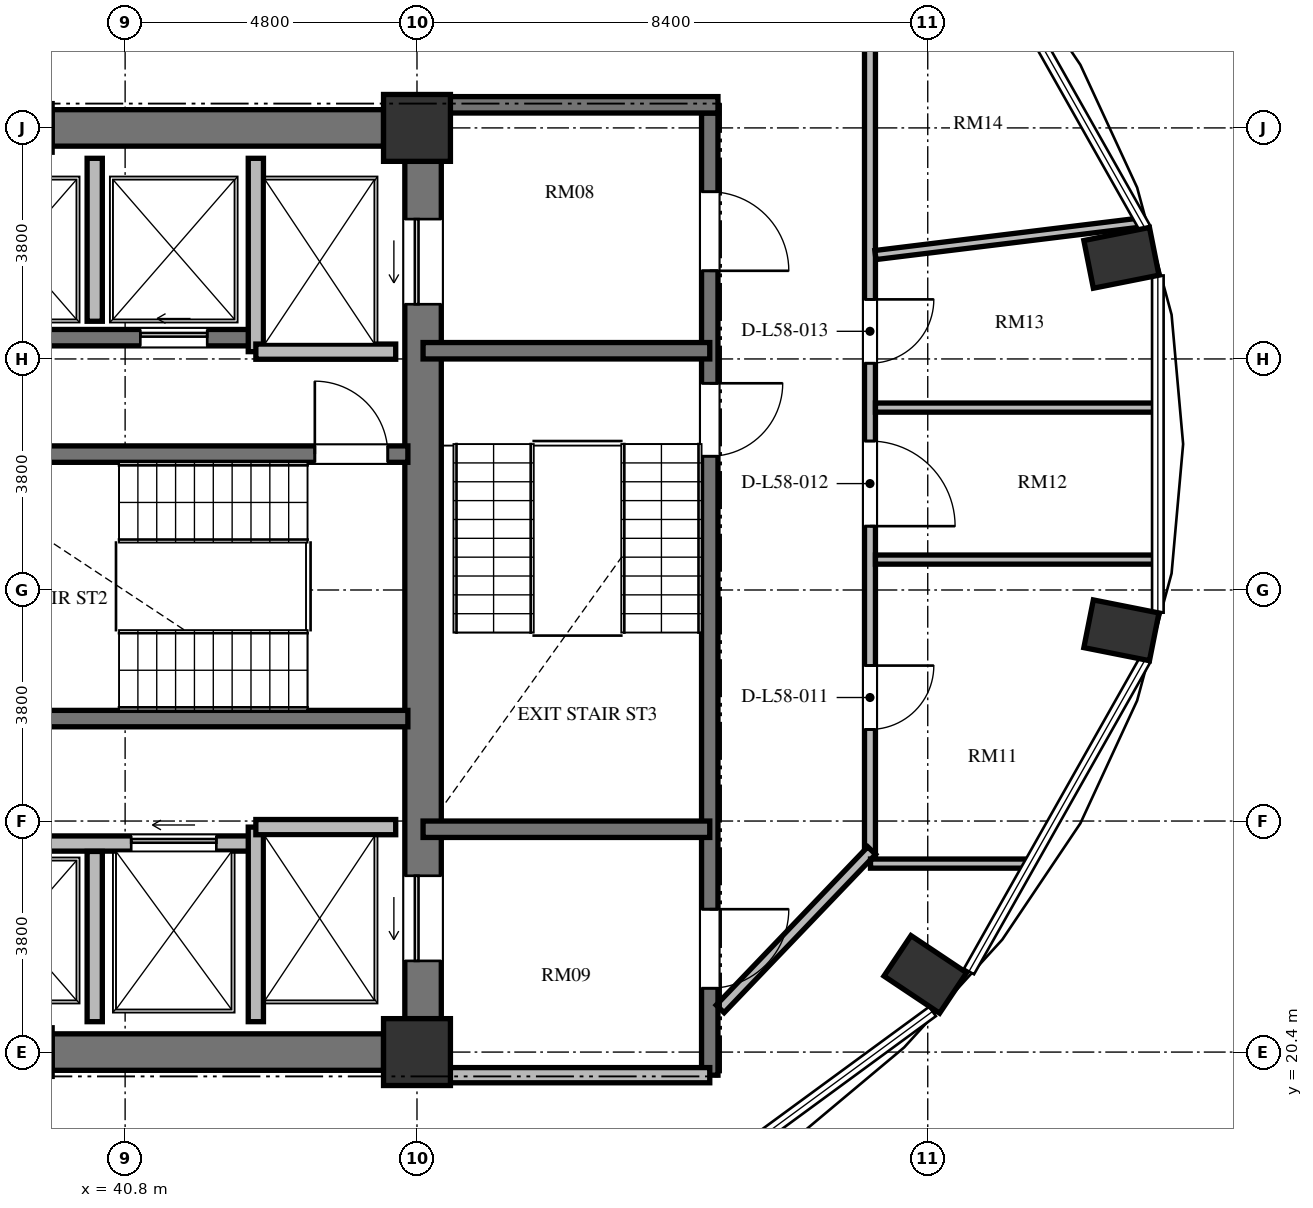
"""IFC4 building model, lengths in metres.
Left out: names, types, materials, properties, quantities, classifications, styles, units other than length and angle.
Written with IfcOpenShell. Run it as: python <this file> out.ifc"""

import sys

from ifc_helpers import new_model, si_unit, direction, frame, frame_2d, origin, origin_2d, place, context, subcontext, project, spatial, rectangle, extrude, element, fill, save


model = new_model("IFC4")
c1 = context("Model", 3, precision=1e-05, world=origin(), true_north=direction((0.0, 1.0)))
c2 = subcontext(c1, "Body", "Model", "MODEL_VIEW")
j1 = project(units=[si_unit("LENGTHUNIT", "METRE"), si_unit("PLANEANGLEUNIT", "RADIAN")], contexts=[c1])
p1 = place(None, origin())
s1 = spatial("IfcSite", under=j1, at=p1, CompositionType="ELEMENT")
p2 = place(p1, origin())
s2 = spatial("IfcBuilding", under=s1, at=p2, CompositionType="ELEMENT")
p3 = place(p2, frame((0.0, 0.0, 224.016)))
s3 = spatial("IfcBuildingStorey", under=s2, at=p3, CompositionType="ELEMENT", Elevation=224.016)
for number, where, z_axis, x_axis in (
    (1, (53.96, 21.677, 0.0), (0.0, 0.0, 1.0), (0.831, -0.556, 0.0)),
    (2, (57.185, 27.337, 0.0), (0.0, 0.0, 1.0), (0.981, -0.195, 0.0)),
    (3, (57.185, 33.463, 0.0), (0.0, 0.0, 1.0), (0.981, 0.195, 0.0)),
):
    element("IfcColumn", number, at=place(p3, frame(where, z_axis=z_axis, x_axis=x_axis)), inside=s3, PredefinedType="COLUMN", context=c2, shape_type="SweptSolid", body=[
        extrude(rectangle(XDim=1.1, YDim=0.8, at=origin_2d()), origin(), (0.0, 0.0, 1.0), 3.648),
    ])
for number, where, z_axis, x_axis in (
    (4, (45.6, 20.4, 0.0), (0.0, 0.0, 1.0), (1.0, 0.0, 0.0)),
    (5, (45.6, 35.6, 0.0), (0.0, 0.0, 1.0), (1.0, 0.0, 0.0)),
):
    element("IfcColumn", number, at=place(p3, frame(where, z_axis=z_axis, x_axis=x_axis)), inside=s3, PredefinedType="COLUMN", context=c2, shape_type="SweptSolid", body=[
        extrude(rectangle(XDim=1.1, YDim=1.1, at=origin_2d()), origin(), (0.0, 0.0, 1.0), 3.648),
    ])
p4 = place(p3, frame((45.7, 20.95, 0.0), z_axis=(0.0, 0.0, 1.0), x_axis=(0.0, 1.0, 0.0)))
e6 = element("IfcWall", 6, at=p4, inside=s3, PredefinedType="SHEAR", context=c2, shape_type="SweptSolid", body=[
    extrude(rectangle(XDim=14.1, YDim=0.6, at=frame_2d((7.05, 0.0))), origin(), (0.0, 0.0, 1.0), 3.648),
])
p5 = place(p4, frame((11.75, 0.0, 0.0)))
e7 = element("IfcOpeningElement", 7, at=p5, cuts=e6, PredefinedType="OPENING", context=c2, shape_type="SweptSolid", body=[
    extrude(rectangle(XDim=1.4, YDim=2.3, at=frame_2d((0.7, 1.15))), frame((0.0, 0.31, 0.0), z_axis=(0.0, -1.0, 0.0), x_axis=(1.0, 0.0, 0.0)), (0.0, 0.0, 1.0), 0.62),
])
p6 = place(p4, frame((0.95, 0.0, 0.0)))
e8 = element("IfcOpeningElement", 8, at=p6, cuts=e6, PredefinedType="OPENING", context=c2, shape_type="SweptSolid", body=[
    extrude(rectangle(XDim=1.4, YDim=2.3, at=frame_2d((0.7, 1.15))), frame((0.0, 0.31, 0.0), z_axis=(0.0, -1.0, 0.0), x_axis=(1.0, 0.0, 0.0)), (0.0, 0.0, 1.0), 0.62),
])
for number, where, z_axis, x_axis in (
    (9, (39.6, 20.4, 0.0), (0.0, 0.0, 1.0), (1.0, 0.0, 0.0)),
    (10, (39.6, 35.6, 0.0), (0.0, 0.0, 1.0), (1.0, 0.0, 0.0)),
):
    element("IfcWall", number, at=place(p3, frame(where, z_axis=z_axis, x_axis=x_axis)), inside=s3, PredefinedType="SHEAR", context=c2, shape_type="SweptSolid", body=[
        extrude(rectangle(XDim=5.45, YDim=0.6, at=frame_2d((2.725, 0.0))), origin(), (0.0, 0.0, 1.0), 3.648),
    ])
p7 = place(p3, frame((37.465, 30.235, 0.0), z_axis=(0.0, 0.0, 1.0), x_axis=(1.0, 0.0, 0.0)))
e11 = element("IfcWall", 11, at=p7, inside=s3, PredefinedType="SHEAR", context=c2, shape_type="SweptSolid", body=[
    extrude(rectangle(XDim=7.985, YDim=0.27, at=frame_2d((3.992, 0.0))), origin(), (0.0, 0.0, 1.0), 3.648),
])
p8 = place(p7, frame((6.455, 0.0, 0.0)))
e12 = element("IfcOpeningElement", 12, at=p8, cuts=e11, PredefinedType="OPENING", context=c2, shape_type="SweptSolid", body=[
    extrude(rectangle(XDim=1.2, YDim=2.15, at=frame_2d((0.6, 1.075))), frame((0.0, 0.145, 0.0), z_axis=(0.0, -1.0, 0.0), x_axis=(1.0, 0.0, 0.0)), (0.0, 0.0, 1.0), 0.29),
])
p9 = place(p3, frame((37.465, 25.885, 0.0), z_axis=(0.0, 0.0, 1.0), x_axis=(1.0, 0.0, 0.0)))
e13 = element("IfcWall", 13, at=p9, inside=s3, PredefinedType="SHEAR", context=c2, shape_type="SweptSolid", body=[
    extrude(rectangle(XDim=7.985, YDim=0.27, at=frame_2d((3.992, 0.0))), origin(), (0.0, 0.0, 1.0), 3.648),
])
p10 = place(p3, frame((26.55, 32.15, 0.0), z_axis=(0.0, 0.0, 1.0), x_axis=(1.0, 0.0, 0.0)))
e14 = element("IfcWall", 14, at=p10, inside=s3, PredefinedType="SHEAR", context=c2, shape_type="SweptSolid", body=[
    extrude(rectangle(XDim=16.4, YDim=0.27, at=frame_2d((8.2, 0.0))), origin(), (0.0, 0.0, 1.0), 3.648),
])
p11 = place(p10, frame((2.175, 0.0, 0.0)))
e15 = element("IfcOpeningElement", 15, at=p11, cuts=e14, PredefinedType="OPENING", context=c2, shape_type="SweptSolid", body=[
    extrude(rectangle(XDim=1.05, YDim=2.15, at=frame_2d((0.525, 1.075))), frame((0.0, 0.145, 0.0), z_axis=(0.0, -1.0, 0.0), x_axis=(1.0, 0.0, 0.0)), (0.0, 0.0, 1.0), 0.29),
])
p12 = place(p10, frame((7.575, 0.0, 0.0)))
e16 = element("IfcOpeningElement", 16, at=p12, cuts=e14, PredefinedType="OPENING", context=c2, shape_type="SweptSolid", body=[
    extrude(rectangle(XDim=1.05, YDim=2.15, at=frame_2d((0.525, 1.075))), frame((0.0, 0.145, 0.0), z_axis=(0.0, -1.0, 0.0), x_axis=(1.0, 0.0, 0.0)), (0.0, 0.0, 1.0), 0.29),
])
p13 = place(p10, frame((11.9, 0.0, 0.0)))
e17 = element("IfcOpeningElement", 17, at=p13, cuts=e14, PredefinedType="OPENING", context=c2, shape_type="SweptSolid", body=[
    extrude(rectangle(XDim=1.1, YDim=2.2, at=frame_2d((0.55, 1.1))), frame((0.0, 0.145, 0.0), z_axis=(0.0, -1.0, 0.0), x_axis=(1.0, 0.0, 0.0)), (0.0, 0.0, 1.0), 0.29),
])
p14 = place(p10, frame((14.5, 0.0, 0.0)))
e18 = element("IfcOpeningElement", 18, at=p14, cuts=e14, PredefinedType="OPENING", context=c2, shape_type="SweptSolid", body=[
    extrude(rectangle(XDim=1.1, YDim=2.2, at=frame_2d((0.55, 1.1))), frame((0.0, 0.145, 0.0), z_axis=(0.0, -1.0, 0.0), x_axis=(1.0, 0.0, 0.0)), (0.0, 0.0, 1.0), 0.29),
])
p15 = place(p3, frame((26.75, 23.83, 0.0), z_axis=(0.0, 0.0, 1.0), x_axis=(1.0, 0.0, 0.0)))
e19 = element("IfcWall", 19, at=p15, inside=s3, PredefinedType="SOLIDWALL", context=c2, shape_type="SweptSolid", body=[
    extrude(rectangle(XDim=16.2, YDim=0.25, at=frame_2d((8.1, 0.0))), origin(), (0.0, 0.0, 1.0), 3.448),
])
p16 = place(p15, frame((4.75, 0.0, 0.0)))
e20 = element("IfcOpeningElement", 20, at=p16, cuts=e19, PredefinedType="OPENING", context=c2, shape_type="SweptSolid", body=[
    extrude(rectangle(XDim=1.4, YDim=2.2, at=frame_2d((0.7, 1.1))), frame((0.0, 0.135, 0.0), z_axis=(0.0, -1.0, 0.0), x_axis=(1.0, 0.0, 0.0)), (0.0, 0.0, 1.0), 0.27),
])
p17 = place(p15, frame((11.7, 0.0, 0.0)))
e21 = element("IfcOpeningElement", 21, at=p17, cuts=e19, PredefinedType="OPENING", context=c2, shape_type="SweptSolid", body=[
    extrude(rectangle(XDim=1.1, YDim=2.2, at=frame_2d((0.55, 1.1))), frame((0.0, 0.135, 0.0), z_axis=(0.0, -1.0, 0.0), x_axis=(1.0, 0.0, 0.0)), (0.0, 0.0, 1.0), 0.27),
])
p18 = place(p15, frame((14.15, 0.0, 0.0)))
e22 = element("IfcOpeningElement", 22, at=p18, cuts=e19, PredefinedType="OPENING", context=c2, shape_type="SweptSolid", body=[
    extrude(rectangle(XDim=1.4, YDim=2.3, at=frame_2d((0.7, 1.15))), frame((0.0, 0.135, 0.0), z_axis=(0.0, -1.0, 0.0), x_axis=(1.0, 0.0, 0.0)), (0.0, 0.0, 1.0), 0.27),
])
p19 = place(p3, frame((42.95, 31.92, 0.0), z_axis=(0.0, 0.0, 1.0), x_axis=(0.0, 1.0, 0.0)))
e23 = element("IfcWall", 23, at=p19, inside=s3, PredefinedType="SOLIDWALL", context=c2, shape_type="SweptSolid", body=[
    extrude(rectangle(XDim=3.18, YDim=0.25, at=frame_2d((1.59, 0.0))), origin(), (0.0, 0.0, 1.0), 3.448),
])
p20 = place(p3, frame((42.95, 31.92, 0.0), z_axis=(0.0, 0.0, 1.0), x_axis=(1.0, 0.0, 0.0)))
e24 = element("IfcWall", 24, at=p20, inside=s3, PredefinedType="SOLIDWALL", context=c2, shape_type="SweptSolid", body=[
    extrude(rectangle(XDim=2.3, YDim=0.25, at=frame_2d((1.15, 0.0))), origin(), (0.0, 0.0, 1.0), 3.448),
])
p21 = place(p3, frame((42.95, 20.9, 0.0), z_axis=(0.0, 0.0, 1.0), x_axis=(0.0, 1.0, 0.0)))
e25 = element("IfcWall", 25, at=p21, inside=s3, PredefinedType="SOLIDWALL", context=c2, shape_type="SweptSolid", body=[
    extrude(rectangle(XDim=3.2, YDim=0.25, at=frame_2d((1.6, 0.0))), origin(), (0.0, 0.0, 1.0), 3.448),
])
p22 = place(p3, frame((42.95, 24.1, 0.0), z_axis=(0.0, 0.0, 1.0), x_axis=(1.0, 0.0, 0.0)))
e26 = element("IfcWall", 26, at=p22, inside=s3, PredefinedType="SOLIDWALL", context=c2, shape_type="SweptSolid", body=[
    extrude(rectangle(XDim=2.3, YDim=0.25, at=frame_2d((1.15, 0.0))), origin(), (0.0, 0.0, 1.0), 3.448),
])
p23 = place(p3, frame((40.3, 32.42, 0.0), z_axis=(0.0, 0.0, 1.0), x_axis=(0.0, 1.0, 0.0)))
e27 = element("IfcWall", 27, at=p23, inside=s3, PredefinedType="SOLIDWALL", context=c2, shape_type="SweptSolid", body=[
    extrude(rectangle(XDim=2.68, YDim=0.25, at=frame_2d((1.34, 0.0))), origin(), (0.0, 0.0, 1.0), 3.448),
])
p24 = place(p3, frame((40.3, 20.9, 0.0), z_axis=(0.0, 0.0, 1.0), x_axis=(0.0, 1.0, 0.0)))
e28 = element("IfcWall", 28, at=p24, inside=s3, PredefinedType="SOLIDWALL", context=c2, shape_type="SweptSolid", body=[
    extrude(rectangle(XDim=2.8, YDim=0.25, at=frame_2d((1.4, 0.0))), origin(), (0.0, 0.0, 1.0), 3.448),
])
p25 = place(p3, frame((50.415, 35.845, 0.0), z_axis=(0.0, 0.0, 1.0), x_axis=(0.0, -1.0, 0.0)))
e29 = element("IfcWall", 29, at=p25, inside=s3, PredefinedType="SHEAR", context=c2, shape_type="SweptSolid", body=[
    extrude(rectangle(XDim=15.825, YDim=0.27, at=frame_2d((7.913, 0.0))), origin(), (0.0, 0.0, 1.0), 3.648),
])
p26 = place(p25, frame((4.445, 0.0, 0.0)))
e30 = element("IfcOpeningElement", 30, at=p26, cuts=e29, PredefinedType="OPENING", context=c2, shape_type="SweptSolid", body=[
    extrude(rectangle(XDim=1.2, YDim=2.15, at=frame_2d((0.6, 1.075))), frame((0.0, 0.145, 0.0), z_axis=(0.0, -1.0, 0.0), x_axis=(1.0, 0.0, 0.0)), (0.0, 0.0, 1.0), 0.29),
])
p27 = place(p25, frame((1.295, 0.0, 0.0)))
e31 = element("IfcOpeningElement", 31, at=p27, cuts=e29, PredefinedType="OPENING", context=c2, shape_type="SweptSolid", body=[
    extrude(rectangle(XDim=1.3, YDim=2.2, at=frame_2d((0.65, 1.1))), frame((0.0, 0.145, 0.0), z_axis=(0.0, -1.0, 0.0), x_axis=(1.0, 0.0, 0.0)), (0.0, 0.0, 1.0), 0.29),
])
p28 = place(p25, frame((13.095, 0.0, 0.0)))
e32 = element("IfcOpeningElement", 32, at=p28, cuts=e29, PredefinedType="OPENING", context=c2, shape_type="SweptSolid", body=[
    extrude(rectangle(XDim=1.3, YDim=2.2, at=frame_2d((0.65, 1.1))), frame((0.0, 0.145, 0.0), z_axis=(0.0, -1.0, 0.0), x_axis=(1.0, 0.0, 0.0)), (0.0, 0.0, 1.0), 0.29),
])
p29 = place(p3, frame((46.0, 35.98, 0.0), z_axis=(0.0, 0.0, 1.0), x_axis=(1.0, 0.0, 0.0)))
e33 = element("IfcWall", 33, at=p29, inside=s3, PredefinedType="SHEAR", context=c2, shape_type="SweptSolid", body=[
    extrude(rectangle(XDim=4.55, YDim=0.27, at=frame_2d((2.275, 0.0))), origin(), (0.0, 0.0, 1.0), 3.648),
])
for number, where, z_axis, x_axis in (
    (34, (45.7, 31.935, 0.0), (0.0, 0.0, 1.0), (1.0, 0.0, 0.0)),
    (35, (45.7, 24.065, 0.0), (0.0, 0.0, 1.0), (1.0, 0.0, 0.0)),
):
    element("IfcWall", number, at=place(p3, frame(where, z_axis=z_axis, x_axis=x_axis)), inside=s3, PredefinedType="SHEAR", context=c2, shape_type="SweptSolid", body=[
        extrude(rectangle(XDim=4.715, YDim=0.27, at=frame_2d((2.357, 0.0))), origin(), (0.0, 0.0, 1.0), 3.648),
    ])
p30 = place(p3, frame((45.7, 20.02, 0.0), z_axis=(0.0, 0.0, 1.0), x_axis=(1.0, 0.0, 0.0)))
e36 = element("IfcWall", 36, at=p30, inside=s3, PredefinedType="SOLIDWALL", context=c2, shape_type="SweptSolid", body=[
    extrude(rectangle(XDim=4.715, YDim=0.25, at=frame_2d((2.357, 0.0))), origin(), (0.0, 0.0, 1.0), 3.448),
])
p31 = place(p3, frame((53.05, 37.155, 0.0), z_axis=(0.0, 0.0, 1.0), x_axis=(0.0, -1.0, 0.0)))
e37 = element("IfcWall", 37, at=p31, inside=s3, PredefinedType="PARTITIONING", context=c2, shape_type="SweptSolid", body=[
    extrude(rectangle(XDim=13.509, YDim=0.18, at=frame_2d((6.754, 0.0))), origin(), (0.0, 0.0, 1.0), 3.448),
])
p32 = place(p31, frame((10.398, 0.0, 0.0)))
e38 = element("IfcOpeningElement", 38, at=p32, cuts=e37, PredefinedType="OPENING", context=c2, shape_type="SweptSolid", body=[
    extrude(rectangle(XDim=1.05, YDim=2.15, at=frame_2d((0.525, 1.075))), frame((0.0, 0.1, 0.0), z_axis=(0.0, -1.0, 0.0), x_axis=(1.0, 0.0, 0.0)), (0.0, 0.0, 1.0), 0.2),
])
p33 = place(p31, frame((6.705, 0.0, 0.0)))
e39 = element("IfcOpeningElement", 39, at=p33, cuts=e37, PredefinedType="OPENING", context=c2, shape_type="SweptSolid", body=[
    extrude(rectangle(XDim=1.4, YDim=2.2, at=frame_2d((0.7, 1.1))), frame((0.0, 0.1, 0.0), z_axis=(0.0, -1.0, 0.0), x_axis=(1.0, 0.0, 0.0)), (0.0, 0.0, 1.0), 0.2),
])
p34 = place(p31, frame((4.375, 0.0, 0.0)))
e40 = element("IfcOpeningElement", 40, at=p34, cuts=e37, PredefinedType="OPENING", context=c2, shape_type="SweptSolid", body=[
    extrude(rectangle(XDim=1.05, YDim=2.15, at=frame_2d((0.525, 1.075))), frame((0.0, 0.1, 0.0), z_axis=(0.0, -1.0, 0.0), x_axis=(1.0, 0.0, 0.0)), (0.0, 0.0, 1.0), 0.2),
])
p35 = place(p3, frame((53.078, 23.714, 0.0), z_axis=(0.0, 0.0, 1.0), x_axis=(-0.691353379446, -0.722516785085, 0.0)))
e41 = element("IfcWall", 41, at=p35, inside=s3, PredefinedType="PARTITIONING", context=c2, shape_type="SweptSolid", body=[
    extrude(rectangle(XDim=3.604, YDim=0.18, at=frame_2d((1.802, 0.0))), origin(), (0.0, 0.0, 1.0), 3.448),
])
p36 = place(p3, frame((53.059, 23.5, 0.0), z_axis=(0.0, 0.0, 1.0), x_axis=(1.0, 0.0, 0.0)))
e42 = element("IfcWall", 42, at=p36, inside=s3, PredefinedType="PARTITIONING", context=c2, shape_type="SweptSolid", body=[
    extrude(rectangle(XDim=2.612, YDim=0.15, at=frame_2d((1.306, 0.0))), origin(), (0.0, 0.0, 1.0), 3.448),
])
for number, where, z_axis, x_axis in (
    (43, (53.14, 28.5, 0.0), (0.0, 0.0, 1.0), (1.0, 0.0, 0.0)),
    (44, (53.14, 31.0, 0.0), (0.0, 0.0, 1.0), (1.0, 0.0, 0.0)),
):
    element("IfcWall", number, at=place(p3, frame(where, z_axis=z_axis, x_axis=x_axis)), inside=s3, PredefinedType="PARTITIONING", context=c2, shape_type="SweptSolid", body=[
        extrude(rectangle(XDim=4.632, YDim=0.15, at=frame_2d((2.316, 0.0))), origin(), (0.0, 0.0, 1.0), 3.448),
    ])
p37 = place(p3, frame((53.139, 33.509, 0.0), z_axis=(0.0, 0.0, 1.0), x_axis=(0.992571001818, 0.121666784083, 0.0)))
e45 = element("IfcWall", 45, at=p37, inside=s3, PredefinedType="PARTITIONING", context=c2, shape_type="SweptSolid", body=[
    extrude(rectangle(XDim=4.417, YDim=0.15, at=frame_2d((2.208, 0.0))), origin(), (0.0, 0.0, 1.0), 3.448),
])
p38 = place(p8, origin())
e46 = element("IfcDoor", 46, at=p38, inside=s3, OperationType="SINGLE_SWING_LEFT", PredefinedType="DOOR", context=c2, shape_type="SweptSolid", body=[
    extrude(rectangle(XDim=1.2, YDim=2.15, at=frame_2d((0.6, 1.075))), frame((0.0, 0.025, 0.0), z_axis=(0.0, -1.0, 0.0), x_axis=(1.0, 0.0, 0.0)), (0.0, 0.0, 1.0), 0.05),
])
fill(e12, e46)
p39 = place(p14, origin())
e47 = element("IfcDoor", 47, at=p39, inside=s3, OperationType="SLIDING_TO_LEFT", PredefinedType="DOOR", context=c2, shape_type="SweptSolid", body=[
    extrude(rectangle(XDim=1.1, YDim=2.2, at=frame_2d((0.55, 1.1))), frame((0.0, 0.025, 0.0), z_axis=(0.0, -1.0, 0.0), x_axis=(1.0, 0.0, 0.0)), (0.0, 0.0, 1.0), 0.05),
])
fill(e18, e47)
p40 = place(p5, origin())
e48 = element("IfcDoor", 48, at=p40, inside=s3, OperationType="SLIDING_TO_LEFT", PredefinedType="DOOR", context=c2, shape_type="SweptSolid", body=[
    extrude(rectangle(XDim=1.4, YDim=2.3, at=frame_2d((0.7, 1.15))), frame((0.0, 0.025, 0.0), z_axis=(0.0, -1.0, 0.0), x_axis=(1.0, 0.0, 0.0)), (0.0, 0.0, 1.0), 0.05),
])
fill(e7, e48)
p41 = place(p6, origin())
e49 = element("IfcDoor", 49, at=p41, inside=s3, OperationType="SLIDING_TO_LEFT", PredefinedType="DOOR", context=c2, shape_type="SweptSolid", body=[
    extrude(rectangle(XDim=1.4, YDim=2.3, at=frame_2d((0.7, 1.15))), frame((0.0, 0.025, 0.0), z_axis=(0.0, -1.0, 0.0), x_axis=(1.0, 0.0, 0.0)), (0.0, 0.0, 1.0), 0.05),
])
fill(e8, e49)
p42 = place(p18, origin())
e50 = element("IfcDoor", 50, at=p42, inside=s3, OperationType="SLIDING_TO_LEFT", PredefinedType="DOOR", context=c2, shape_type="SweptSolid", body=[
    extrude(rectangle(XDim=1.4, YDim=2.3, at=frame_2d((0.7, 1.15))), frame((0.0, 0.025, 0.0), z_axis=(0.0, -1.0, 0.0), x_axis=(1.0, 0.0, 0.0)), (0.0, 0.0, 1.0), 0.05),
])
fill(e22, e50)
p43 = place(p26, origin())
e51 = element("IfcDoor", 51, at=p43, inside=s3, OperationType="SINGLE_SWING_LEFT", PredefinedType="DOOR", context=c2, shape_type="SweptSolid", body=[
    extrude(rectangle(XDim=1.2, YDim=2.15, at=frame_2d((0.6, 1.075))), frame((0.0, 0.025, 0.0), z_axis=(0.0, -1.0, 0.0), x_axis=(1.0, 0.0, 0.0)), (0.0, 0.0, 1.0), 0.05),
])
fill(e30, e51)
p44 = place(p27, origin())
e52 = element("IfcDoor", 52, at=p44, inside=s3, OperationType="SINGLE_SWING_RIGHT", PredefinedType="DOOR", context=c2, shape_type="SweptSolid", body=[
    extrude(rectangle(XDim=1.3, YDim=2.2, at=frame_2d((0.65, 1.1))), frame((0.0, 0.025, 0.0), z_axis=(0.0, -1.0, 0.0), x_axis=(1.0, 0.0, 0.0)), (0.0, 0.0, 1.0), 0.05),
])
fill(e31, e52)
p45 = place(p28, origin())
e53 = element("IfcDoor", 53, at=p45, inside=s3, OperationType="SINGLE_SWING_LEFT", PredefinedType="DOOR", context=c2, shape_type="SweptSolid", body=[
    extrude(rectangle(XDim=1.3, YDim=2.2, at=frame_2d((0.65, 1.1))), frame((0.0, 0.025, 0.0), z_axis=(0.0, -1.0, 0.0), x_axis=(1.0, 0.0, 0.0)), (0.0, 0.0, 1.0), 0.05),
])
fill(e32, e53)
p46 = place(p32, origin())
e54 = element("IfcDoor", 54, at=p46, inside=s3, OperationType="SINGLE_SWING_LEFT", PredefinedType="DOOR", context=c2, shape_type="SweptSolid", body=[
    extrude(rectangle(XDim=1.05, YDim=2.15, at=frame_2d((0.525, 1.075))), frame((0.0, 0.025, 0.0), z_axis=(0.0, -1.0, 0.0), x_axis=(1.0, 0.0, 0.0)), (0.0, 0.0, 1.0), 0.05),
])
fill(e38, e54)
p47 = place(p33, origin())
e55 = element("IfcDoor", 55, at=p47, inside=s3, OperationType="SINGLE_SWING_RIGHT", PredefinedType="DOOR", context=c2, shape_type="SweptSolid", body=[
    extrude(rectangle(XDim=1.4, YDim=2.2, at=frame_2d((0.7, 1.1))), frame((0.0, 0.025, 0.0), z_axis=(0.0, -1.0, 0.0), x_axis=(1.0, 0.0, 0.0)), (0.0, 0.0, 1.0), 0.05),
])
fill(e39, e55)
p48 = place(p34, origin())
e56 = element("IfcDoor", 56, at=p48, inside=s3, OperationType="SINGLE_SWING_LEFT", PredefinedType="DOOR", context=c2, shape_type="SweptSolid", body=[
    extrude(rectangle(XDim=1.05, YDim=2.15, at=frame_2d((0.525, 1.075))), frame((0.0, 0.025, 0.0), z_axis=(0.0, -1.0, 0.0), x_axis=(1.0, 0.0, 0.0)), (0.0, 0.0, 1.0), 0.05),
])
fill(e40, e56)
save(model, sys.argv[1])
